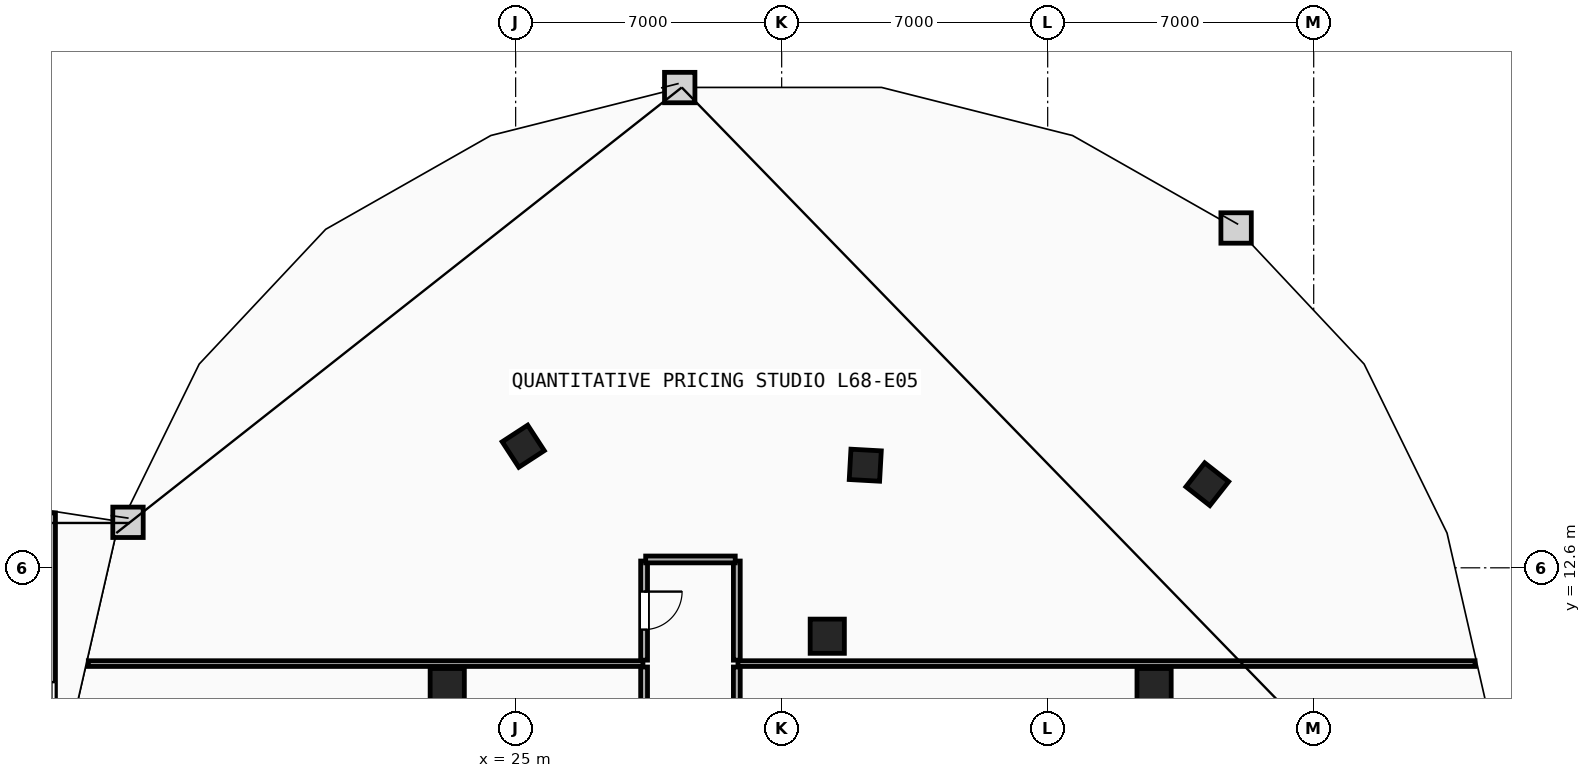
"""IFC4 building model, lengths in metres.
Left out: names, types, materials, properties, quantities, classifications, styles, units other than length and angle.
Written with IfcOpenShell. Run it as: python <this file> out.ifc"""

import sys

from ifc_helpers import new_model, si_unit, direction, frame, frame_2d, origin, origin_2d, place, context, subcontext, project, spatial, rectangle, extrude, element, fill, save


model = new_model("IFC4")
c1 = context("Model", 3, precision=1e-05, world=origin(), true_north=direction((0.0, 1.0)))
c2 = subcontext(c1, "Body", "Model", "MODEL_VIEW")
j1 = project(units=[si_unit("LENGTHUNIT", "METRE"), si_unit("PLANEANGLEUNIT", "RADIAN")], contexts=[c1])
p1 = place(None, origin())
s1 = spatial("IfcSite", under=j1, at=p1, CompositionType="ELEMENT")
p2 = place(p1, origin())
s2 = spatial("IfcBuilding", under=s1, at=p2, CompositionType="ELEMENT")
p3 = place(p2, frame((0.0, 0.0, 257.6)))
s3 = spatial("IfcBuildingStorey", under=s2, at=p3, CompositionType="ELEMENT", Elevation=257.6)
for number, where, z_axis, x_axis in (
    (1, (41.8, 9.5, 0.0), (0.0, 0.0, 1.0), (1.0, 0.0, 0.0)),
    (2, (33.2, 10.8, 0.0), (0.0, 0.0, 1.0), (1.0, 0.0, 0.0)),
    (3, (23.2, 9.5, 0.0), (0.0, 0.0, 1.0), (1.0, 0.0, 0.0)),
):
    element("IfcColumn", number, at=place(p3, frame(where, z_axis=z_axis, x_axis=x_axis)), inside=s3, PredefinedType="COLUMN", context=c2, shape_type="SweptSolid", body=[
        extrude(rectangle(XDim=0.9, YDim=0.9, at=origin_2d()), origin(), (0.0, 0.0, 1.0), 3.6),
    ])
for number, where, z_axis, x_axis in (
    (4, (43.2, 14.8, 0.0), (0.0, 0.0, 1.0), (-0.786, 0.618, 0.0)),
    (5, (34.2, 15.3, 0.0), (0.0, 0.0, 1.0), (-0.998, 0.055, 0.0)),
    (6, (25.2, 15.8, 0.0), (0.0, 0.0, 1.0), (-0.838, -0.546, 0.0)),
):
    element("IfcColumn", number, at=place(p3, frame(where, z_axis=z_axis, x_axis=x_axis)), inside=s3, PredefinedType="COLUMN", context=c2, shape_type="SweptSolid", body=[
        extrude(rectangle(XDim=0.8, YDim=0.8, at=origin_2d()), origin(), (0.0, 0.0, 1.0), 3.6),
    ])
p4 = place(p3, frame((13.755, 10.08, 0.0), z_axis=(0.0, 0.0, 1.0), x_axis=(1.0, 0.0, 0.0)))
e7 = element("IfcWall", 7, at=p4, inside=s3, PredefinedType="PARTITIONING", context=c2, shape_type="SweptSolid", body=[
    extrude(rectangle(XDim=14.595, YDim=0.15, at=frame_2d((7.297, 0.0))), origin(), (0.0, 0.0, 1.0), 2.724),
])
p5 = place(p3, frame((30.85, 10.08, 0.0), z_axis=(0.0, 0.0, 1.0), x_axis=(1.0, 0.0, 0.0)))
e8 = element("IfcWall", 8, at=p5, inside=s3, PredefinedType="PARTITIONING", context=c2, shape_type="SweptSolid", body=[
    extrude(rectangle(XDim=19.395, YDim=0.15, at=frame_2d((9.697, 0.0))), origin(), (0.0, 0.0, 1.0), 2.724),
])
p6 = place(p3, frame((30.82, 0.45, 0.0), z_axis=(0.0, 0.0, 1.0), x_axis=(0.0, 1.0, 0.0)))
e9 = element("IfcWall", 9, at=p6, inside=s3, PredefinedType="PARTITIONING", context=c2, shape_type="SweptSolid", body=[
    extrude(rectangle(XDim=9.54, YDim=0.18, at=frame_2d((4.77, 0.0))), origin(), (0.0, 0.0, 1.0), 3.34),
])
p7 = place(p6, frame((4.27, 0.0, 0.0)))
e10 = element("IfcOpeningElement", 10, at=p7, cuts=e9, PredefinedType="OPENING", context=c2, shape_type="SweptSolid", body=[
    extrude(rectangle(XDim=1.0, YDim=2.15, at=frame_2d((0.5, 1.075))), frame((0.0, 0.1, 0.0), z_axis=(0.0, -1.0, 0.0), x_axis=(1.0, 0.0, 0.0)), (0.0, 0.0, 1.0), 0.2),
])
p8 = place(p3, frame((28.38, 9.99, 0.0), z_axis=(0.0, 0.0, 1.0), x_axis=(0.0, -1.0, 0.0)))
e11 = element("IfcWall", 11, at=p8, inside=s3, PredefinedType="PARTITIONING", context=c2, shape_type="SweptSolid", body=[
    extrude(rectangle(XDim=9.54, YDim=0.18, at=frame_2d((4.77, 0.0))), origin(), (0.0, 0.0, 1.0), 3.34),
])
p9 = place(p8, frame((3.77, 0.0, 1.05)))
e12 = element("IfcOpeningElement", 12, at=p9, cuts=e11, PredefinedType="OPENING", context=c2, shape_type="SweptSolid", body=[
    extrude(rectangle(XDim=2.0, YDim=1.5, at=frame_2d((1.0, 0.75))), frame((0.0, 0.1, 0.0), z_axis=(0.0, -1.0, 0.0), x_axis=(1.0, 0.0, 0.0)), (0.0, 0.0, 1.0), 0.2),
])
p10 = place(p3, frame((28.38, 12.779, 0.0), z_axis=(0.0, 0.0, 1.0), x_axis=(0.0, -1.0, 0.0)))
e13 = element("IfcWall", 13, at=p10, inside=s3, PredefinedType="PARTITIONING", context=c2, shape_type="SweptSolid", body=[
    extrude(rectangle(XDim=2.609, YDim=0.18, at=frame_2d((1.304, 0.0))), origin(), (0.0, 0.0, 1.0), 3.34),
])
p11 = place(p10, frame((0.804, 0.0, 0.0)))
e14 = element("IfcOpeningElement", 14, at=p11, cuts=e13, PredefinedType="OPENING", context=c2, shape_type="SweptSolid", body=[
    extrude(rectangle(XDim=1.0, YDim=2.15, at=frame_2d((0.5, 1.075))), frame((0.0, 0.1, 0.0), z_axis=(0.0, -1.0, 0.0), x_axis=(1.0, 0.0, 0.0)), (0.0, 0.0, 1.0), 0.2),
])
p12 = place(p3, frame((30.82, 10.17, 0.0), z_axis=(0.0, 0.0, 1.0), x_axis=(0.0, 1.0, 0.0)))
e15 = element("IfcWall", 15, at=p12, inside=s3, PredefinedType="PARTITIONING", context=c2, shape_type="SweptSolid", body=[
    extrude(rectangle(XDim=2.609, YDim=0.18, at=frame_2d((1.304, 0.0))), origin(), (0.0, 0.0, 1.0), 3.34),
])
p13 = place(p3, frame((30.779, 12.82, 0.0), z_axis=(0.0, 0.0, 1.0), x_axis=(-1.0, 0.0, 0.0)))
e16 = element("IfcWall", 16, at=p13, inside=s3, PredefinedType="PARTITIONING", context=c2, shape_type="SweptSolid", body=[
    extrude(rectangle(XDim=2.357, YDim=0.18, at=frame_2d((1.179, 0.0))), origin(), (0.0, 0.0, 1.0), 3.34),
])
p14 = place(p3, frame((12.8, 3.74, 0.0), z_axis=(0.0, 0.0, 1.0), x_axis=(0.0, 1.0, 0.0)))
e17 = element("IfcWall", 17, at=p14, inside=s3, PredefinedType="PARTITIONING", context=c2, shape_type="SweptSolid", body=[
    extrude(rectangle(XDim=10.304, YDim=0.18, at=frame_2d((5.152, 0.0))), origin(), (0.0, 0.0, 1.0), 3.34),
])
p15 = place(p14, frame((4.452, 0.0, 1.05)))
e18 = element("IfcOpeningElement", 18, at=p15, cuts=e17, PredefinedType="OPENING", context=c2, shape_type="SweptSolid", body=[
    extrude(rectangle(XDim=1.4, YDim=1.5, at=frame_2d((0.7, 0.75))), frame((0.0, 0.1, 0.0), z_axis=(0.0, -1.0, 0.0), x_axis=(1.0, 0.0, 0.0)), (0.0, 0.0, 1.0), 0.2),
])
p16 = place(p11, origin())
e19 = element("IfcDoor", 19, at=p16, inside=s3, OperationType="SINGLE_SWING_LEFT", PredefinedType="DOOR", context=c2, shape_type="SweptSolid", body=[
    extrude(rectangle(XDim=1.0, YDim=2.15, at=frame_2d((0.5, 1.075))), frame((0.0, 0.025, 0.0), z_axis=(0.0, -1.0, 0.0), x_axis=(1.0, 0.0, 0.0)), (0.0, 0.0, 1.0), 0.05),
])
fill(e14, e19)
p17 = place(p15, origin())
e20 = element("IfcWindow", 20, at=p17, inside=s3, PartitioningType="SINGLE_PANEL", PredefinedType="WINDOW", context=c2, shape_type="SweptSolid", body=[
    extrude(rectangle(XDim=1.4, YDim=1.5, at=frame_2d((0.7, 0.75))), frame((0.0, 0.03, 0.0), z_axis=(0.0, -1.0, 0.0), x_axis=(1.0, 0.0, 0.0)), (0.0, 0.0, 1.0), 0.06),
])
fill(e18, e20)
save(model, sys.argv[1])
